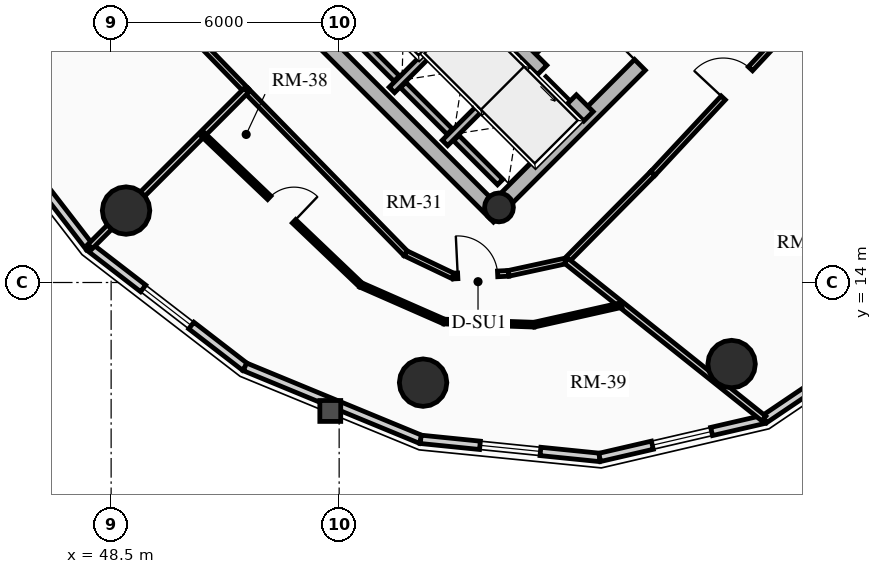
"""IFC4 building model, lengths in metres.
Left out: names, types, materials, properties, quantities, classifications, styles, units other than length and angle.
Written with IfcOpenShell. Run it as: python <this file> out.ifc"""

import sys

from ifc_helpers import new_model, si_unit, direction, frame, frame_2d, origin, origin_2d, place, context, subcontext, project, spatial, rectangle, circle, hollow_circle, extrude, source, transform, mapped, element, fill, save


model = new_model("IFC4")
c1 = context("Model", 3, precision=1e-05, world=origin(), true_north=direction((0.0, 1.0)))
c2 = subcontext(c1, "Body", "Model", "MODEL_VIEW")
j1 = project(units=[si_unit("LENGTHUNIT", "METRE"), si_unit("PLANEANGLEUNIT", "RADIAN")], contexts=[c1])
p1 = place(None, origin())
s1 = spatial("IfcSite", under=j1, at=p1, CompositionType="ELEMENT")
p2 = place(p1, origin())
s2 = spatial("IfcBuilding", under=s1, at=p2, CompositionType="ELEMENT")
p3 = place(p2, frame((0.0, 0.0, 171.97)))
s3 = spatial("IfcBuildingStorey", under=s2, at=p3, CompositionType="ELEMENT", Elevation=171.97)
p4 = place(p3, frame((58.702, 15.732, 0.0), z_axis=(0.0, 0.0, 1.0), x_axis=(-0.707106781187, 0.707106781187, 0.0)))
e1 = element("IfcWall", 1, at=p4, inside=s3, PredefinedType="SHEAR", context=c2, shape_type="SweptSolid", body=[
    extrude(rectangle(XDim=14.1, YDim=0.4, at=frame_2d((7.05, 0.0))), origin(), (0.0, 0.0, 1.0), 2.91),
])
p5 = place(p3, frame((58.561, 15.873, 0.0), z_axis=(0.0, 0.0, 1.0), x_axis=(0.707106781187, 0.707106781187, 0.0)))
e2 = element("IfcWall", 2, at=p5, inside=s3, PredefinedType="SHEAR", context=c2, shape_type="SweptSolid", body=[
    extrude(rectangle(XDim=10.7, YDim=0.4, at=frame_2d((5.35, 0.0))), origin(), (0.0, 0.0, 1.0), 2.91),
])
m1 = source(origin(), c2, "Body", "SweptSolid", [
    extrude(rectangle(XDim=1.5, YDim=2.02, at=frame_2d((0.75, 1.01))), frame((0.0, 0.21, 0.0), z_axis=(0.0, -1.0, 0.0), x_axis=(1.0, 0.0, 0.0)), (0.0, 0.0, 1.0), 0.42),
])
p6 = place(p5, frame((5.45, 0.0, 0.0)))
e3 = element("IfcOpeningElement", 3, at=p6, cuts=e2, PredefinedType="OPENING", context=c2, shape_type="MappedRepresentation", body=[
    mapped(m1, transform((0.0, 0.0, 0.0), x_axis=(1.0, 0.0, 0.0), y_axis=(0.0, 1.0, 0.0), z_axis=(0.0, 0.0, 1.0), scale=1.0)),
])
p7 = place(p3, frame((61.06, 18.373, 0.0), z_axis=(0.0, 0.0, 1.0), x_axis=(-0.707106781187, 0.707106781187, 0.0)))
e4 = element("IfcWall", 4, at=p7, inside=s3, PredefinedType="SHEAR", context=c2, shape_type="SweptSolid", body=[
    extrude(rectangle(XDim=13.7, YDim=0.35, at=frame_2d((6.85, 0.0))), origin(), (0.0, 0.0, 1.0), 2.91),
])
m2 = source(origin(), c2, "Body", "SweptSolid", [
    extrude(rectangle(XDim=1.1, YDim=2.015, at=frame_2d((0.55, 1.007))), frame((0.0, 0.185, 0.0), z_axis=(0.0, -1.0, 0.0), x_axis=(1.0, 0.0, 0.0)), (0.0, 0.0, 1.0), 0.37),
])
p8 = place(p7, frame((4.85, 0.0, 0.0)))
e5 = element("IfcOpeningElement", 5, at=p8, cuts=e4, PredefinedType="OPENING", context=c2, shape_type="MappedRepresentation", body=[
    mapped(m2, transform((0.0, 0.0, 0.0), x_axis=(1.0, 0.0, 0.0), y_axis=(0.0, 1.0, 0.0), z_axis=(0.0, 0.0, 1.0), scale=1.0)),
])
p9 = place(p7, frame((0.625, 0.0, 0.0)))
e6 = element("IfcOpeningElement", 6, at=p9, cuts=e4, PredefinedType="OPENING", context=c2, shape_type="MappedRepresentation", body=[
    mapped(m2, transform((0.0, 0.0, 0.0), x_axis=(1.0, 0.0, 0.0), y_axis=(0.0, 1.0, 0.0), z_axis=(0.0, 0.0, 1.0), scale=1.0)),
])
p10 = place(p7, frame((2.625, 0.0, 0.0)))
e7 = element("IfcOpeningElement", 7, at=p10, cuts=e4, PredefinedType="OPENING", context=c2, shape_type="MappedRepresentation", body=[
    mapped(m2, transform((0.0, 0.0, 0.0), x_axis=(1.0, 0.0, 0.0), y_axis=(0.0, 1.0, 0.0), z_axis=(0.0, 0.0, 1.0), scale=1.0)),
])
m3 = source(origin(), c2, "Body", "SweptSolid", [
    extrude(rectangle(XDim=1.15, YDim=2.02, at=frame_2d((0.575, 1.01))), frame((0.0, 0.185, 0.0), z_axis=(0.0, -1.0, 0.0), x_axis=(1.0, 0.0, 0.0)), (0.0, 0.0, 1.0), 0.37),
])
p11 = place(p7, frame((7.27, 0.0, 0.0)))
e8 = element("IfcOpeningElement", 8, at=p11, cuts=e4, PredefinedType="OPENING", context=c2, shape_type="MappedRepresentation", body=[
    mapped(m3, transform((0.0, 0.0, 0.0), x_axis=(1.0, 0.0, 0.0), y_axis=(0.0, 1.0, 0.0), z_axis=(0.0, 0.0, 1.0), scale=1.0)),
])
p12 = place(p3, frame((58.706, 15.976, 0.0), z_axis=(0.0, 0.0, 1.0), x_axis=(0.707106781187, 0.707106781187, 0.0)))
e9 = element("IfcColumn", 9, at=p12, inside=s3, PredefinedType="COLUMN", context=c2, shape_type="SweptSolid", body=[
    extrude(hollow_circle(Radius=0.38, WallThickness=0.032, at=origin_2d()), origin(), (0.0, 0.0, 1.0), 2.91),
])
for number, where, z_axis, x_axis in (
    (10, (48.893, 15.893, 0.0), (0.0, 0.0, 1.0), (1.0, 0.0, 0.0)),
    (11, (56.709, 11.365, 0.0), (0.0, 0.0, 1.0), (1.0, 0.0, 0.0)),
    (12, (64.827, 11.854, 0.0), (0.0, 0.0, 1.0), (1.0, 0.0, 0.0)),
):
    element("IfcColumn", number, at=place(p3, frame(where, z_axis=z_axis, x_axis=x_axis)), inside=s3, PredefinedType="USERDEFINED", context=c2, shape_type="SweptSolid", body=[
        extrude(circle(Radius=0.625, at=origin_2d()), origin(), (0.0, 0.0, 1.0), 2.91),
    ])
p13 = place(p3, frame((47.932, 14.932, 0.0), z_axis=(0.0, 0.0, 1.0), x_axis=(-0.610569654715, 0.791962560189, 0.0)))
e13 = element("IfcWall", 13, at=p13, inside=s3, PredefinedType="SOLIDWALL", context=c2, shape_type="SweptSolid", body=[
    extrude(rectangle(XDim=5.163, YDim=0.22, at=frame_2d((2.582, 0.0))), origin(), (0.0, 0.0, 1.0), 2.245),
])
p14 = place(p3, frame((52.021, 11.78, 0.0), z_axis=(0.0, 0.0, 1.0), x_axis=(-0.791962560189, 0.610569654715, 0.0)))
e14 = element("IfcWall", 14, at=p14, inside=s3, PredefinedType="SOLIDWALL", context=c2, shape_type="SweptSolid", body=[
    extrude(rectangle(XDim=5.163, YDim=0.22, at=frame_2d((2.582, 0.0))), origin(), (0.0, 0.0, 1.0), 2.245),
])
m4 = source(origin(), c2, "Body", "SweptSolid", [
    extrude(rectangle(XDim=1.6, YDim=1.3, at=frame_2d((0.8, 0.65))), frame((0.0, 0.12, 0.0), z_axis=(0.0, -1.0, 0.0), x_axis=(1.0, 0.0, 0.0)), (0.0, 0.0, 1.0), 0.24),
])
p15 = place(p14, frame((1.782, 0.0, 0.65)))
e15 = element("IfcOpeningElement", 15, at=p15, cuts=e14, PredefinedType="OPENING", context=c2, shape_type="MappedRepresentation", body=[
    mapped(m4, transform((0.0, 0.0, 0.0), x_axis=(1.0, 0.0, 0.0), y_axis=(0.0, 1.0, 0.0), z_axis=(0.0, 0.0, 1.0), scale=1.0)),
])
p16 = place(p3, frame((56.646, 9.873, 0.0), z_axis=(0.0, 0.0, 1.0), x_axis=(-0.924494066201, 0.381196434348, 0.0)))
e16 = element("IfcWall", 16, at=p16, inside=s3, PredefinedType="SOLIDWALL", context=c2, shape_type="SweptSolid", body=[
    extrude(rectangle(XDim=5.003, YDim=0.22, at=frame_2d((2.501, 0.0))), origin(), (0.0, 0.0, 1.0), 2.245),
])
p17 = place(p3, frame((61.355, 9.397, 0.0), z_axis=(0.0, 0.0, 1.0), x_axis=(-0.994943283129, 0.100438356004, 0.0)))
e17 = element("IfcWall", 17, at=p17, inside=s3, PredefinedType="SOLIDWALL", context=c2, shape_type="SweptSolid", body=[
    extrude(rectangle(XDim=4.733, YDim=0.22, at=frame_2d((2.366, 0.0))), origin(), (0.0, 0.0, 1.0), 2.245),
])
p18 = place(p17, frame((1.566, 0.0, 0.65)))
e18 = element("IfcOpeningElement", 18, at=p18, cuts=e17, PredefinedType="OPENING", context=c2, shape_type="MappedRepresentation", body=[
    mapped(m4, transform((0.0, 0.0, 0.0), x_axis=(1.0, 0.0, 0.0), y_axis=(0.0, 1.0, 0.0), z_axis=(0.0, 0.0, 1.0), scale=1.0)),
])
p19 = place(p3, frame((65.687, 10.4, 0.0), z_axis=(0.0, 0.0, 1.0), x_axis=(-0.97422620202, -0.22557328587, 0.0)))
e19 = element("IfcWall", 19, at=p19, inside=s3, PredefinedType="SOLIDWALL", context=c2, shape_type="SweptSolid", body=[
    extrude(rectangle(XDim=4.446, YDim=0.22, at=frame_2d((2.223, 0.0))), origin(), (0.0, 0.0, 1.0), 2.245),
])
p20 = place(p19, frame((1.423, 0.0, 0.65)))
e20 = element("IfcOpeningElement", 20, at=p20, cuts=e19, PredefinedType="OPENING", context=c2, shape_type="MappedRepresentation", body=[
    mapped(m4, transform((0.0, 0.0, 0.0), x_axis=(1.0, 0.0, 0.0), y_axis=(0.0, 1.0, 0.0), z_axis=(0.0, 0.0, 1.0), scale=1.0)),
])
p21 = place(p3, frame((69.217, 12.783, 0.0), z_axis=(0.0, 0.0, 1.0), x_axis=(-0.828817439852, -0.55951912514, 0.0)))
e21 = element("IfcWall", 21, at=p21, inside=s3, PredefinedType="SOLIDWALL", context=c2, shape_type="SweptSolid", body=[
    extrude(rectangle(XDim=4.259, YDim=0.22, at=frame_2d((2.129, 0.0))), origin(), (0.0, 0.0, 1.0), 2.245),
])
p22 = place(p3, frame((55.888, 19.069, 0.0), z_axis=(0.0, 0.0, 1.0), x_axis=(0.707106781187, 0.707106781187, 0.0)))
e22 = element("IfcWall", 22, at=p22, inside=s3, PredefinedType="SHEAR", context=c2, shape_type="SweptSolid", body=[
    extrude(rectangle(XDim=2.97, YDim=0.2, at=frame_2d((1.485, 0.0))), origin(), (0.0, 0.0, 1.0), 2.91),
])
p23 = place(p3, frame((56.015, 19.366, 0.0), z_axis=(0.0, 0.0, 1.0), x_axis=(-0.707106781187, 0.707106781187, 0.0)))
e23 = element("IfcWall", 23, at=p23, inside=s3, PredefinedType="SHEAR", context=c2, shape_type="SweptSolid", body=[
    extrude(rectangle(XDim=2.44, YDim=0.2, at=frame_2d((1.22, 0.0))), origin(), (0.0, 0.0, 1.0), 2.91),
])
p24 = place(p3, frame((57.284, 17.673, 0.0), z_axis=(0.0, 0.0, 1.0), x_axis=(0.707147878904, 0.70706568108, 0.0)))
e24 = element("IfcWall", 24, at=p24, inside=s3, PredefinedType="SHEAR", context=c2, shape_type="SweptSolid", body=[
    extrude(rectangle(XDim=2.97, YDim=0.2, at=frame_2d((1.485, 0.0))), origin(), (0.0, 0.0, 1.0), 2.91),
])
p25 = place(p3, frame((57.412, 17.97, 0.0), z_axis=(0.0, 0.0, 1.0), x_axis=(-0.707106781187, 0.707106781187, 0.0)))
e25 = element("IfcWall", 25, at=p25, inside=s3, PredefinedType="SHEAR", context=c2, shape_type="SweptSolid", body=[
    extrude(rectangle(XDim=1.735, YDim=0.2, at=frame_2d((0.867, 0.0))), origin(), (0.0, 0.0, 1.0), 2.91),
])
p26 = place(p3, frame((58.737, 16.644, 0.0), z_axis=(0.0, 0.0, 1.0), x_axis=(-0.707032117043, 0.707181437447, 0.0)))
e26 = element("IfcWall", 26, at=p26, inside=s3, PredefinedType="SHEAR", context=c2, shape_type="SweptSolid", body=[
    extrude(rectangle(XDim=1.635, YDim=0.2, at=frame_2d((0.817, 0.0))), origin(), (0.0, 0.0, 1.0), 2.91),
])
p27 = place(p3, frame((59.643, 20.066, 0.0), z_axis=(0.0, 0.0, 1.0), x_axis=(0.707106781187, 0.707106781187, 0.0)))
e27 = element("IfcWall", 27, at=p27, inside=s3, PredefinedType="PARTITIONING", context=c2, shape_type="SweptSolid", body=[
    extrude(rectangle(XDim=1.1, YDim=0.125, at=frame_2d((0.55, 0.0))), origin(), (0.0, 0.0, 1.0), 2.675),
])
p28 = place(p3, frame((47.959, 23.277, 0.0), z_axis=(0.0, 0.0, 1.0), x_axis=(0.696422573496, -0.717631938479, 0.0)))
e28 = element("IfcWall", 28, at=p28, inside=s3, PredefinedType="PARTITIONING", context=c2, shape_type="SweptSolid", body=[
    extrude(rectangle(XDim=5.882, YDim=0.15, at=frame_2d((2.941, 0.0))), origin(), (0.0, 0.0, 1.0), 2.675),
])
m5 = source(origin(), c2, "Body", "SweptSolid", [
    extrude(rectangle(XDim=1.0, YDim=2.015, at=frame_2d((0.5, 1.007))), frame((0.0, 0.085, 0.0), z_axis=(0.0, -1.0, 0.0), x_axis=(1.0, 0.0, 0.0)), (0.0, 0.0, 1.0), 0.17),
])
p29 = place(p28, frame((2.441, 0.0, 0.0)))
e29 = element("IfcOpeningElement", 29, at=p29, cuts=e28, PredefinedType="OPENING", context=c2, shape_type="MappedRepresentation", body=[
    mapped(m5, transform((0.0, 0.0, 0.0), x_axis=(1.0, 0.0, 0.0), y_axis=(0.0, 1.0, 0.0), z_axis=(0.0, 0.0, 1.0), scale=1.0)),
])
p30 = place(p3, frame((52.055, 19.055, 0.0), z_axis=(0.0, 0.0, 1.0), x_axis=(0.699249850691, -0.714877364524, 0.0)))
e30 = element("IfcWall", 30, at=p30, inside=s3, PredefinedType="PARTITIONING", context=c2, shape_type="SweptSolid", body=[
    extrude(rectangle(XDim=5.999, YDim=0.15, at=frame_2d((3.0, 0.0))), origin(), (0.0, 0.0, 1.0), 2.245),
])
p31 = place(p3, frame((56.25, 14.767, 0.0), z_axis=(0.0, 0.0, 1.0), x_axis=(0.902518380752, -0.430651335078, 0.0)))
e31 = element("IfcWall", 31, at=p31, inside=s3, PredefinedType="PARTITIONING", context=c2, shape_type="SweptSolid", body=[
    extrude(rectangle(XDim=1.386, YDim=0.15, at=frame_2d((0.693, 0.0))), origin(), (0.0, 0.0, 1.0), 2.245),
])
p32 = place(p3, frame((57.501, 14.17, 0.0), z_axis=(0.0, 0.0, 1.0), x_axis=(0.998814137693, 0.048685915254, 0.0)))
e32 = element("IfcWall", 32, at=p32, inside=s3, PredefinedType="PARTITIONING", context=c2, shape_type="SweptSolid", body=[
    extrude(rectangle(XDim=1.459, YDim=0.15, at=frame_2d((0.729, 0.0))), origin(), (0.0, 0.0, 1.0), 2.245),
])
m6 = source(origin(), c2, "Body", "SweptSolid", [
    extrude(rectangle(XDim=1.05, YDim=2.015, at=frame_2d((0.525, 1.007))), frame((0.0, 0.085, 0.0), z_axis=(0.0, -1.0, 0.0), x_axis=(1.0, 0.0, 0.0)), (0.0, 0.0, 1.0), 0.17),
])
p33 = place(p32, frame((0.12, 0.0, 0.0)))
e33 = element("IfcOpeningElement", 33, at=p33, cuts=e32, PredefinedType="OPENING", context=c2, shape_type="MappedRepresentation", body=[
    mapped(m6, transform((0.0, 0.0, 0.0), x_axis=(1.0, 0.0, 0.0), y_axis=(0.0, 1.0, 0.0), z_axis=(0.0, 0.0, 1.0), scale=1.0)),
])
p34 = place(p3, frame((58.959, 14.241, 0.0), z_axis=(0.0, 0.0, 1.0), x_axis=(0.977216106897, 0.212246744196, 0.0)))
e34 = element("IfcWall", 34, at=p34, inside=s3, PredefinedType="PARTITIONING", context=c2, shape_type="SweptSolid", body=[
    extrude(rectangle(XDim=1.552, YDim=0.15, at=frame_2d((0.776, 0.0))), origin(), (0.0, 0.0, 1.0), 2.245),
])
p35 = place(p3, frame((60.475, 14.57, 0.0), z_axis=(0.0, 0.0, 1.0), x_axis=(0.703709284374, 0.710488031628, 0.0)))
e35 = element("IfcWall", 35, at=p35, inside=s3, PredefinedType="PARTITIONING", context=c2, shape_type="SweptSolid", body=[
    extrude(rectangle(XDim=3.241, YDim=0.15, at=frame_2d((1.621, 0.0))), origin(), (0.0, 0.0, 1.0), 2.245),
])
p36 = place(p3, frame((62.756, 16.873, 0.0), z_axis=(0.0, 0.0, 1.0), x_axis=(0.682136885079, 0.73122450042, 0.0)))
e36 = element("IfcWall", 36, at=p36, inside=s3, PredefinedType="PARTITIONING", context=c2, shape_type="SweptSolid", body=[
    extrude(rectangle(XDim=6.476, YDim=0.15, at=frame_2d((3.238, 0.0))), origin(), (0.0, 0.0, 1.0), 2.245),
])
p37 = place(p36, frame((2.713, 0.0, 0.0)))
e37 = element("IfcOpeningElement", 37, at=p37, cuts=e36, PredefinedType="OPENING", context=c2, shape_type="MappedRepresentation", body=[
    mapped(m6, transform((0.0, 0.0, 0.0), x_axis=(1.0, 0.0, 0.0), y_axis=(0.0, 1.0, 0.0), z_axis=(0.0, 0.0, 1.0), scale=1.0)),
])
p38 = place(p3, frame((52.055, 19.055, 0.0), z_axis=(0.0, 0.0, 1.0), x_axis=(-0.707106781187, -0.707106781187, 0.0)))
e38 = element("IfcWall", 38, at=p38, inside=s3, PredefinedType="PARTITIONING", context=c2, shape_type="SweptSolid", body=[
    extrude(rectangle(XDim=5.811, YDim=0.16, at=frame_2d((2.906, 0.0))), origin(), (0.0, 0.0, 1.0), 2.245),
])
p39 = place(p3, frame((60.475, 14.57, 0.0), z_axis=(0.0, 0.0, 1.0), x_axis=(0.78156967059, -0.623817962241, 0.0)))
e39 = element("IfcWall", 39, at=p39, inside=s3, PredefinedType="PARTITIONING", context=c2, shape_type="SweptSolid", body=[
    extrude(rectangle(XDim=6.656, YDim=0.16, at=frame_2d((3.328, 0.0))), origin(), (0.0, 0.0, 1.0), 2.245),
])
p40 = place(p3, frame((50.905, 17.905, 0.0), z_axis=(0.0, 0.0, 1.0), x_axis=(0.723816902075, -0.689992095803, 0.0)))
e40 = element("IfcWall", 40, at=p40, inside=s3, PredefinedType="PARTITIONING", context=c2, shape_type="SweptSolid", body=[
    extrude(rectangle(XDim=5.753, YDim=0.125, at=frame_2d((2.876, 0.0))), origin(), (0.0, 0.0, 1.0), 2.245),
])
m7 = source(origin(), c2, "Body", "SweptSolid", [
    extrude(rectangle(XDim=0.9, YDim=2.005, at=frame_2d((0.45, 1.002))), frame((0.0, 0.073, 0.0), z_axis=(0.0, -1.0, 0.0), x_axis=(1.0, 0.0, 0.0)), (0.0, 0.0, 1.0), 0.145),
])
p41 = place(p40, frame((2.426, 0.0, 0.0)))
e41 = element("IfcOpeningElement", 41, at=p41, cuts=e40, PredefinedType="OPENING", context=c2, shape_type="MappedRepresentation", body=[
    mapped(m7, transform((0.0, 0.0, 0.0), x_axis=(1.0, 0.0, 0.0), y_axis=(0.0, 1.0, 0.0), z_axis=(0.0, 0.0, 1.0), scale=1.0)),
])
p42 = place(p3, frame((55.069, 13.936, 0.0), z_axis=(0.0, 0.0, 1.0), x_axis=(0.915625735972, -0.402031729626, 0.0)))
e42 = element("IfcWall", 42, at=p42, inside=s3, PredefinedType="PARTITIONING", context=c2, shape_type="SweptSolid", body=[
    extrude(rectangle(XDim=2.396, YDim=0.125, at=frame_2d((1.198, 0.0))), origin(), (0.0, 0.0, 1.0), 2.245),
])
p43 = place(p3, frame((57.263, 12.972, 0.0), z_axis=(0.0, 0.0, 1.0), x_axis=(0.999399614086, -0.034646953192, 0.0)))
e43 = element("IfcWall", 43, at=p43, inside=s3, PredefinedType="PARTITIONING", context=c2, shape_type="SweptSolid", body=[
    extrude(rectangle(XDim=2.368, YDim=0.125, at=frame_2d((1.184, 0.0))), origin(), (0.0, 0.0, 1.0), 2.245),
])
p44 = place(p3, frame((59.629, 12.89, 0.0), z_axis=(0.0, 0.0, 1.0), x_axis=(0.97566344203, 0.219273454585, 0.0)))
e44 = element("IfcWall", 44, at=p44, inside=s3, PredefinedType="PARTITIONING", context=c2, shape_type="SweptSolid", body=[
    extrude(rectangle(XDim=2.36, YDim=0.125, at=frame_2d((1.18, 0.0))), origin(), (0.0, 0.0, 1.0), 2.245),
])
m8 = source(origin(), c2, "Body", "SweptSolid", [
    extrude(rectangle(XDim=1.6, YDim=1.3, at=frame_2d((0.8, 0.65))), frame((0.0, 0.03, 0.0), z_axis=(0.0, -1.0, 0.0), x_axis=(1.0, 0.0, 0.0)), (0.0, 0.0, 1.0), 0.06),
])
p45 = place(p15, origin())
e45 = element("IfcWindow", 45, at=p45, inside=s3, PartitioningType="SINGLE_PANEL", PredefinedType="WINDOW", context=c2, shape_type="MappedRepresentation", body=[
    mapped(m8, transform((0.0, 0.0, 0.0), x_axis=(1.0, 0.0, 0.0), y_axis=(0.0, 1.0, 0.0), z_axis=(0.0, 0.0, 1.0), scale=1.0)),
])
fill(e15, e45)
p46 = place(p18, origin())
e46 = element("IfcWindow", 46, at=p46, inside=s3, PartitioningType="SINGLE_PANEL", PredefinedType="WINDOW", context=c2, shape_type="MappedRepresentation", body=[
    mapped(m8, transform((0.0, 0.0, 0.0), x_axis=(1.0, 0.0, 0.0), y_axis=(0.0, 1.0, 0.0), z_axis=(0.0, 0.0, 1.0), scale=1.0)),
])
fill(e18, e46)
p47 = place(p20, origin())
e47 = element("IfcWindow", 47, at=p47, inside=s3, PartitioningType="SINGLE_PANEL", PredefinedType="WINDOW", context=c2, shape_type="MappedRepresentation", body=[
    mapped(m8, transform((0.0, 0.0, 0.0), x_axis=(1.0, 0.0, 0.0), y_axis=(0.0, 1.0, 0.0), z_axis=(0.0, 0.0, 1.0), scale=1.0)),
])
fill(e20, e47)
m9 = source(origin(), c2, "Body", "SweptSolid", [
    extrude(rectangle(XDim=1.1, YDim=2.015, at=frame_2d((0.55, 1.007))), frame((0.0, 0.025, 0.0), z_axis=(0.0, -1.0, 0.0), x_axis=(1.0, 0.0, 0.0)), (0.0, 0.0, 1.0), 0.05),
])
p48 = place(p9, origin())
e48 = element("IfcDoor", 48, at=p48, inside=s3, OperationType="SLIDING_TO_LEFT", PredefinedType="DOOR", context=c2, shape_type="MappedRepresentation", body=[
    mapped(m9, transform((0.0, 0.0, 0.0), x_axis=(1.0, 0.0, 0.0), y_axis=(0.0, 1.0, 0.0), z_axis=(0.0, 0.0, 1.0), scale=1.0)),
])
fill(e6, e48)
m10 = source(origin(), c2, "Body", "SweptSolid", [
    extrude(rectangle(XDim=1.5, YDim=2.02, at=frame_2d((0.75, 1.01))), frame((0.0, 0.025, 0.0), z_axis=(0.0, -1.0, 0.0), x_axis=(1.0, 0.0, 0.0)), (0.0, 0.0, 1.0), 0.05),
])
p49 = place(p6, origin())
e49 = element("IfcDoor", 49, at=p49, inside=s3, OperationType="DOUBLE_DOOR_SINGLE_SWING", PredefinedType="DOOR", context=c2, shape_type="MappedRepresentation", body=[
    mapped(m10, transform((0.0, 0.0, 0.0), x_axis=(1.0, 0.0, 0.0), y_axis=(0.0, 1.0, 0.0), z_axis=(0.0, 0.0, 1.0), scale=1.0)),
])
fill(e3, e49)
m11 = source(origin(), c2, "Body", "SweptSolid", [
    extrude(rectangle(XDim=1.05, YDim=2.015, at=frame_2d((0.525, 1.007))), frame((0.0, 0.025, 0.0), z_axis=(0.0, -1.0, 0.0), x_axis=(1.0, 0.0, 0.0)), (0.0, 0.0, 1.0), 0.05),
])
p50 = place(p33, origin())
e50 = element("IfcDoor", 50, at=p50, inside=s3, OperationType="SINGLE_SWING_LEFT", PredefinedType="DOOR", context=c2, shape_type="MappedRepresentation", body=[
    mapped(m11, transform((0.0, 0.0, 0.0), x_axis=(1.0, 0.0, 0.0), y_axis=(0.0, 1.0, 0.0), z_axis=(0.0, 0.0, 1.0), scale=1.0)),
])
fill(e33, e50)
m12 = source(origin(), c2, "Body", "SweptSolid", [
    extrude(rectangle(XDim=0.9, YDim=2.005, at=frame_2d((0.45, 1.002))), frame((0.0, 0.025, 0.0), z_axis=(0.0, -1.0, 0.0), x_axis=(1.0, 0.0, 0.0)), (0.0, 0.0, 1.0), 0.05),
])
p51 = place(p41, origin())
e51 = element("IfcDoor", 51, at=p51, inside=s3, OperationType="SINGLE_SWING_RIGHT", PredefinedType="DOOR", context=c2, shape_type="MappedRepresentation", body=[
    mapped(m12, transform((0.0, 0.0, 0.0), x_axis=(1.0, 0.0, 0.0), y_axis=(0.0, 1.0, 0.0), z_axis=(0.0, 0.0, 1.0), scale=1.0)),
])
fill(e41, e51)
p52 = place(p37, origin())
e52 = element("IfcDoor", 52, at=p52, inside=s3, OperationType="SINGLE_SWING_LEFT", PredefinedType="DOOR", context=c2, shape_type="MappedRepresentation", body=[
    mapped(m11, transform((0.0, 0.0, 0.0), x_axis=(1.0, 0.0, 0.0), y_axis=(0.0, 1.0, 0.0), z_axis=(0.0, 0.0, 1.0), scale=1.0)),
])
fill(e37, e52)
save(model, sys.argv[1])
